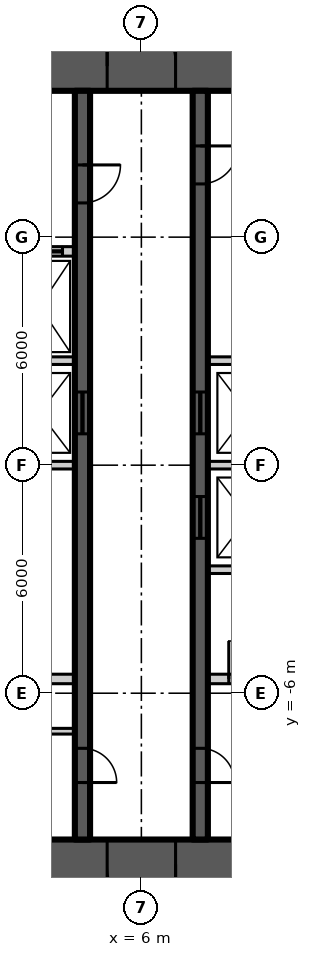
"""IFC4 building model, lengths in metres.
Left out: names, types, materials, properties, quantities, classifications, styles, units other than length and angle.
Written with IfcOpenShell. Run it as: python <this file> out.ifc"""

import sys

from ifc_helpers import new_model, si_unit, direction, frame, frame_2d, origin, place, context, subcontext, project, spatial, rectangle, extrude, element, fill, save


model = new_model("IFC4")
c1 = context("Model", 3, precision=1e-05, world=origin(), true_north=direction((0.0, 1.0)))
c2 = subcontext(c1, "Body", "Model", "MODEL_VIEW")
j1 = project(units=[si_unit("LENGTHUNIT", "METRE"), si_unit("PLANEANGLEUNIT", "RADIAN")], contexts=[c1])
p1 = place(None, origin())
s1 = spatial("IfcSite", under=j1, at=p1, CompositionType="ELEMENT")
p2 = place(p1, origin())
s2 = spatial("IfcBuilding", under=s1, at=p2, CompositionType="ELEMENT")
p3 = place(p2, frame((0.0, 0.0, 298.5)))
s3 = spatial("IfcBuildingStorey", under=s2, at=p3, CompositionType="ELEMENT", Elevation=298.5)
p4 = place(p3, frame((-11.15, 10.5, 0.0), z_axis=(0.0, 0.0, 1.0), x_axis=(1.0, 0.0, 0.0)))
e1 = element("IfcWall", 1, at=p4, inside=s3, PredefinedType="SHEAR", context=c2, shape_type="SweptSolid", body=[
    extrude(rectangle(XDim=22.3, YDim=1.3, at=frame_2d((11.15, 0.0))), origin(), (0.0, 0.0, 1.0), 3.9),
])
p5 = place(p4, frame((4.25, 0.0, 0.0)))
e2 = element("IfcOpeningElement", 2, at=p5, cuts=e1, PredefinedType="OPENING", context=c2, shape_type="SweptSolid", body=[
    extrude(rectangle(XDim=1.8, YDim=2.2, at=frame_2d((0.9, 1.1))), frame((0.0, 0.66, 0.0), z_axis=(0.0, -1.0, 0.0), x_axis=(1.0, 0.0, 0.0)), (0.0, 0.0, 1.0), 1.32),
])
p6 = place(p4, frame((16.25, 0.0, 0.0)))
e3 = element("IfcOpeningElement", 3, at=p6, cuts=e1, PredefinedType="OPENING", context=c2, shape_type="SweptSolid", body=[
    extrude(rectangle(XDim=1.8, YDim=2.2, at=frame_2d((0.9, 1.1))), frame((0.0, 0.66, 0.0), z_axis=(0.0, -1.0, 0.0), x_axis=(1.0, 0.0, 0.0)), (0.0, 0.0, 1.0), 1.32),
])
p7 = place(p3, frame((11.15, -10.5, 0.0), z_axis=(0.0, 0.0, 1.0), x_axis=(-1.0, 0.0, 0.0)))
e4 = element("IfcWall", 4, at=p7, inside=s3, PredefinedType="SHEAR", context=c2, shape_type="SweptSolid", body=[
    extrude(rectangle(XDim=22.3, YDim=1.3, at=frame_2d((11.15, 0.0))), origin(), (0.0, 0.0, 1.0), 3.9),
])
p8 = place(p7, frame((16.25, 0.0, 0.0)))
e5 = element("IfcOpeningElement", 5, at=p8, cuts=e4, PredefinedType="OPENING", context=c2, shape_type="SweptSolid", body=[
    extrude(rectangle(XDim=1.8, YDim=2.2, at=frame_2d((0.9, 1.1))), frame((0.0, 0.66, 0.0), z_axis=(0.0, -1.0, 0.0), x_axis=(1.0, 0.0, 0.0)), (0.0, 0.0, 1.0), 1.32),
])
p9 = place(p7, frame((4.25, 0.0, 0.0)))
e6 = element("IfcOpeningElement", 6, at=p9, cuts=e4, PredefinedType="OPENING", context=c2, shape_type="SweptSolid", body=[
    extrude(rectangle(XDim=1.8, YDim=2.2, at=frame_2d((0.9, 1.1))), frame((0.0, 0.66, 0.0), z_axis=(0.0, -1.0, 0.0), x_axis=(1.0, 0.0, 0.0)), (0.0, 0.0, 1.0), 1.32),
])
p10 = place(p3, frame((7.55, 9.85, 0.0), z_axis=(0.0, 0.0, 1.0), x_axis=(0.0, -1.0, 0.0)))
e7 = element("IfcWall", 7, at=p10, inside=s3, PredefinedType="SHEAR", context=c2, shape_type="SweptSolid", body=[
    extrude(rectangle(XDim=19.7, YDim=0.4, at=frame_2d((9.85, 0.0))), origin(), (0.0, 0.0, 1.0), 3.9),
])
p11 = place(p10, frame((1.45, 0.0, 0.0)))
e8 = element("IfcOpeningElement", 8, at=p11, cuts=e7, PredefinedType="OPENING", context=c2, shape_type="SweptSolid", body=[
    extrude(rectangle(XDim=1.0, YDim=2.2, at=frame_2d((0.5, 1.1))), frame((0.0, 0.21, 0.0), z_axis=(0.0, -1.0, 0.0), x_axis=(1.0, 0.0, 0.0)), (0.0, 0.0, 1.0), 0.42),
])
p12 = place(p10, frame((17.3, 0.0, 0.0)))
e9 = element("IfcOpeningElement", 9, at=p12, cuts=e7, PredefinedType="OPENING", context=c2, shape_type="SweptSolid", body=[
    extrude(rectangle(XDim=0.9, YDim=2.1, at=frame_2d((0.45, 1.05))), frame((0.0, 0.21, 0.0), z_axis=(0.0, -1.0, 0.0), x_axis=(1.0, 0.0, 0.0)), (0.0, 0.0, 1.0), 0.42),
])
p13 = place(p10, frame((7.925, 0.0, 0.0)))
e10 = element("IfcOpeningElement", 10, at=p13, cuts=e7, PredefinedType="OPENING", context=c2, shape_type="SweptSolid", body=[
    extrude(rectangle(XDim=1.1, YDim=2.2, at=frame_2d((0.55, 1.1))), frame((0.0, 0.21, 0.0), z_axis=(0.0, -1.0, 0.0), x_axis=(1.0, 0.0, 0.0)), (0.0, 0.0, 1.0), 0.42),
])
p14 = place(p10, frame((10.675, 0.0, 0.0)))
e11 = element("IfcOpeningElement", 11, at=p14, cuts=e7, PredefinedType="OPENING", context=c2, shape_type="SweptSolid", body=[
    extrude(rectangle(XDim=1.1, YDim=2.2, at=frame_2d((0.55, 1.1))), frame((0.0, 0.21, 0.0), z_axis=(0.0, -1.0, 0.0), x_axis=(1.0, 0.0, 0.0)), (0.0, 0.0, 1.0), 0.42),
])
p15 = place(p3, frame((4.45, 9.85, 0.0), z_axis=(0.0, 0.0, 1.0), x_axis=(0.0, -1.0, 0.0)))
e12 = element("IfcWall", 12, at=p15, inside=s3, PredefinedType="SHEAR", context=c2, shape_type="SweptSolid", body=[
    extrude(rectangle(XDim=19.7, YDim=0.4, at=frame_2d((9.85, 0.0))), origin(), (0.0, 0.0, 1.0), 3.9),
])
p16 = place(p15, frame((1.95, 0.0, 0.0)))
e13 = element("IfcOpeningElement", 13, at=p16, cuts=e12, PredefinedType="OPENING", context=c2, shape_type="SweptSolid", body=[
    extrude(rectangle(XDim=1.0, YDim=2.2, at=frame_2d((0.5, 1.1))), frame((0.0, 0.21, 0.0), z_axis=(0.0, -1.0, 0.0), x_axis=(1.0, 0.0, 0.0)), (0.0, 0.0, 1.0), 0.42),
])
p17 = place(p15, frame((17.3, 0.0, 0.0)))
e14 = element("IfcOpeningElement", 14, at=p17, cuts=e12, PredefinedType="OPENING", context=c2, shape_type="SweptSolid", body=[
    extrude(rectangle(XDim=0.9, YDim=2.1, at=frame_2d((0.45, 1.05))), frame((0.0, 0.21, 0.0), z_axis=(0.0, -1.0, 0.0), x_axis=(1.0, 0.0, 0.0)), (0.0, 0.0, 1.0), 0.42),
])
p18 = place(p15, frame((7.925, 0.0, 0.0)))
e15 = element("IfcOpeningElement", 15, at=p18, cuts=e12, PredefinedType="OPENING", context=c2, shape_type="SweptSolid", body=[
    extrude(rectangle(XDim=1.1, YDim=2.2, at=frame_2d((0.55, 1.1))), frame((0.0, 0.21, 0.0), z_axis=(0.0, -1.0, 0.0), x_axis=(1.0, 0.0, 0.0)), (0.0, 0.0, 1.0), 0.42),
])
p19 = place(p3, frame((2.4, 5.625, 0.0), z_axis=(0.0, 0.0, 1.0), x_axis=(1.0, 0.0, 0.0)))
e16 = element("IfcWall", 16, at=p19, inside=s3, PredefinedType="SOLIDWALL", context=c2, shape_type="SweptSolid", body=[
    extrude(rectangle(XDim=1.85, YDim=0.25, at=frame_2d((0.925, 0.0))), origin(), (0.0, 0.0, 1.0), 3.7),
])
p20 = place(p19, frame((0.325, 0.0, 0.0)))
e17 = element("IfcOpeningElement", 17, at=p20, cuts=e16, PredefinedType="OPENING", context=c2, shape_type="SweptSolid", body=[
    extrude(rectangle(XDim=1.2, YDim=2.2, at=frame_2d((0.6, 1.1))), frame((0.0, 0.135, 0.0), z_axis=(0.0, -1.0, 0.0), x_axis=(1.0, 0.0, 0.0)), (0.0, 0.0, 1.0), 0.27),
])
p21 = place(p3, frame((2.4, -5.625, 0.0), z_axis=(0.0, 0.0, 1.0), x_axis=(1.0, 0.0, 0.0)))
e18 = element("IfcWall", 18, at=p21, inside=s3, PredefinedType="SOLIDWALL", context=c2, shape_type="SweptSolid", body=[
    extrude(rectangle(XDim=1.85, YDim=0.25, at=frame_2d((0.925, 0.0))), origin(), (0.0, 0.0, 1.0), 3.7),
])
p22 = place(p3, frame((7.75, -5.625, 0.0), z_axis=(0.0, 0.0, 1.0), x_axis=(1.0, 0.0, 0.0)))
e19 = element("IfcWall", 19, at=p22, inside=s3, PredefinedType="SOLIDWALL", context=c2, shape_type="SweptSolid", body=[
    extrude(rectangle(XDim=2.1, YDim=0.25, at=frame_2d((1.05, 0.0))), origin(), (0.0, 0.0, 1.0), 3.7),
])
p23 = place(p22, frame((0.55, 0.0, 0.0)))
e20 = element("IfcOpeningElement", 20, at=p23, cuts=e19, PredefinedType="OPENING", context=c2, shape_type="SweptSolid", body=[
    extrude(rectangle(XDim=1.0, YDim=2.2, at=frame_2d((0.5, 1.1))), frame((0.0, 0.135, 0.0), z_axis=(0.0, -1.0, 0.0), x_axis=(1.0, 0.0, 0.0)), (0.0, 0.0, 1.0), 0.27),
])
p24 = place(p3, frame((7.75, -2.75, 0.0), z_axis=(0.0, 0.0, 1.0), x_axis=(1.0, 0.0, 0.0)))
e21 = element("IfcWall", 21, at=p24, inside=s3, PredefinedType="SOLIDWALL", context=c2, shape_type="SweptSolid", body=[
    extrude(rectangle(XDim=2.1, YDim=0.2, at=frame_2d((1.05, 0.0))), origin(), (0.0, 0.0, 1.0), 3.7),
])
p25 = place(p3, frame((2.4, 0.0, 0.0), z_axis=(0.0, 0.0, 1.0), x_axis=(1.0, 0.0, 0.0)))
e22 = element("IfcWall", 22, at=p25, inside=s3, PredefinedType="SOLIDWALL", context=c2, shape_type="SweptSolid", body=[
    extrude(rectangle(XDim=1.85, YDim=0.2, at=frame_2d((0.925, 0.0))), origin(), (0.0, 0.0, 1.0), 3.7),
])
p26 = place(p3, frame((7.75, 0.0, 0.0), z_axis=(0.0, 0.0, 1.0), x_axis=(1.0, 0.0, 0.0)))
e23 = element("IfcWall", 23, at=p26, inside=s3, PredefinedType="SOLIDWALL", context=c2, shape_type="SweptSolid", body=[
    extrude(rectangle(XDim=2.1, YDim=0.2, at=frame_2d((1.05, 0.0))), origin(), (0.0, 0.0, 1.0), 3.7),
])
p27 = place(p3, frame((2.4, 2.75, 0.0), z_axis=(0.0, 0.0, 1.0), x_axis=(1.0, 0.0, 0.0)))
e24 = element("IfcWall", 24, at=p27, inside=s3, PredefinedType="SOLIDWALL", context=c2, shape_type="SweptSolid", body=[
    extrude(rectangle(XDim=1.85, YDim=0.2, at=frame_2d((0.925, 0.0))), origin(), (0.0, 0.0, 1.0), 3.7),
])
p28 = place(p3, frame((7.75, 2.75, 0.0), z_axis=(0.0, 0.0, 1.0), x_axis=(1.0, 0.0, 0.0)))
e25 = element("IfcWall", 25, at=p28, inside=s3, PredefinedType="SOLIDWALL", context=c2, shape_type="SweptSolid", body=[
    extrude(rectangle(XDim=2.1, YDim=0.2, at=frame_2d((1.05, 0.0))), origin(), (0.0, 0.0, 1.0), 3.7),
])
p29 = place(p3, frame((2.4, -7.0, 0.0), z_axis=(0.0, 0.0, 1.0), x_axis=(1.0, 0.0, 0.0)))
e26 = element("IfcWall", 26, at=p29, inside=s3, PredefinedType="SOLIDWALL", context=c2, shape_type="SweptSolid", body=[
    extrude(rectangle(XDim=1.85, YDim=0.15, at=frame_2d((0.925, 0.0))), origin(), (0.0, 0.0, 1.0), 3.77),
])
p30 = place(p29, frame((0.1, 0.0, 0.0)))
e27 = element("IfcOpeningElement", 27, at=p30, cuts=e26, PredefinedType="OPENING", context=c2, shape_type="SweptSolid", body=[
    extrude(rectangle(XDim=0.9, YDim=2.1, at=frame_2d((0.45, 1.05))), frame((0.0, 0.085, 0.0), z_axis=(0.0, -1.0, 0.0), x_axis=(1.0, 0.0, 0.0)), (0.0, 0.0, 1.0), 0.17),
])
p31 = place(p6, origin())
e28 = element("IfcDoor", 28, at=p31, inside=s3, OperationType="DOUBLE_DOOR_DOUBLE_SWING", PredefinedType="DOOR", context=c2, shape_type="SweptSolid", body=[
    extrude(rectangle(XDim=1.8, YDim=2.2, at=frame_2d((0.9, 1.1))), frame((0.0, 0.025, 0.0), z_axis=(0.0, -1.0, 0.0), x_axis=(1.0, 0.0, 0.0)), (0.0, 0.0, 1.0), 0.05),
])
fill(e3, e28)
p32 = place(p9, origin())
e29 = element("IfcDoor", 29, at=p32, inside=s3, OperationType="DOUBLE_DOOR_DOUBLE_SWING", PredefinedType="DOOR", context=c2, shape_type="SweptSolid", body=[
    extrude(rectangle(XDim=1.8, YDim=2.2, at=frame_2d((0.9, 1.1))), frame((0.0, 0.025, 0.0), z_axis=(0.0, -1.0, 0.0), x_axis=(1.0, 0.0, 0.0)), (0.0, 0.0, 1.0), 0.05),
])
fill(e6, e29)
p33 = place(p11, origin())
e30 = element("IfcDoor", 30, at=p33, inside=s3, OperationType="SINGLE_SWING_LEFT", PredefinedType="DOOR", context=c2, shape_type="SweptSolid", body=[
    extrude(rectangle(XDim=1.0, YDim=2.2, at=frame_2d((0.5, 1.1))), frame((0.0, 0.025, 0.0), z_axis=(0.0, -1.0, 0.0), x_axis=(1.0, 0.0, 0.0)), (0.0, 0.0, 1.0), 0.05),
])
fill(e8, e30)
p34 = place(p16, origin())
e31 = element("IfcDoor", 31, at=p34, inside=s3, OperationType="SINGLE_SWING_LEFT", PredefinedType="DOOR", context=c2, shape_type="SweptSolid", body=[
    extrude(rectangle(XDim=1.0, YDim=2.2, at=frame_2d((0.5, 1.1))), frame((0.0, 0.025, 0.0), z_axis=(0.0, -1.0, 0.0), x_axis=(1.0, 0.0, 0.0)), (0.0, 0.0, 1.0), 0.05),
])
fill(e13, e31)
p35 = place(p12, origin())
e32 = element("IfcDoor", 32, at=p35, inside=s3, OperationType="SINGLE_SWING_RIGHT", PredefinedType="DOOR", context=c2, shape_type="SweptSolid", body=[
    extrude(rectangle(XDim=0.9, YDim=2.1, at=frame_2d((0.45, 1.05))), frame((0.0, 0.025, 0.0), z_axis=(0.0, -1.0, 0.0), x_axis=(1.0, 0.0, 0.0)), (0.0, 0.0, 1.0), 0.05),
])
fill(e9, e32)
p36 = place(p17, origin())
e33 = element("IfcDoor", 33, at=p36, inside=s3, OperationType="SINGLE_SWING_RIGHT", PredefinedType="DOOR", context=c2, shape_type="SweptSolid", body=[
    extrude(rectangle(XDim=0.9, YDim=2.1, at=frame_2d((0.45, 1.05))), frame((0.0, 0.025, 0.0), z_axis=(0.0, -1.0, 0.0), x_axis=(1.0, 0.0, 0.0)), (0.0, 0.0, 1.0), 0.05),
])
fill(e14, e33)
p37 = place(p13, origin())
e34 = element("IfcDoor", 34, at=p37, inside=s3, OperationType="SLIDING_TO_LEFT", PredefinedType="DOOR", context=c2, shape_type="SweptSolid", body=[
    extrude(rectangle(XDim=1.1, YDim=2.2, at=frame_2d((0.55, 1.1))), frame((0.0, 0.025, 0.0), z_axis=(0.0, -1.0, 0.0), x_axis=(1.0, 0.0, 0.0)), (0.0, 0.0, 1.0), 0.05),
])
fill(e10, e34)
p38 = place(p14, origin())
e35 = element("IfcDoor", 35, at=p38, inside=s3, OperationType="SLIDING_TO_LEFT", PredefinedType="DOOR", context=c2, shape_type="SweptSolid", body=[
    extrude(rectangle(XDim=1.1, YDim=2.2, at=frame_2d((0.55, 1.1))), frame((0.0, 0.025, 0.0), z_axis=(0.0, -1.0, 0.0), x_axis=(1.0, 0.0, 0.0)), (0.0, 0.0, 1.0), 0.05),
])
fill(e11, e35)
p39 = place(p18, origin())
e36 = element("IfcDoor", 36, at=p39, inside=s3, OperationType="SLIDING_TO_LEFT", PredefinedType="DOOR", context=c2, shape_type="SweptSolid", body=[
    extrude(rectangle(XDim=1.1, YDim=2.2, at=frame_2d((0.55, 1.1))), frame((0.0, 0.025, 0.0), z_axis=(0.0, -1.0, 0.0), x_axis=(1.0, 0.0, 0.0)), (0.0, 0.0, 1.0), 0.05),
])
fill(e15, e36)
p40 = place(p20, origin())
e37 = element("IfcDoor", 37, at=p40, inside=s3, OperationType="SLIDING_TO_LEFT", PredefinedType="DOOR", context=c2, shape_type="SweptSolid", body=[
    extrude(rectangle(XDim=1.2, YDim=2.2, at=frame_2d((0.6, 1.1))), frame((0.0, 0.025, 0.0), z_axis=(0.0, -1.0, 0.0), x_axis=(1.0, 0.0, 0.0)), (0.0, 0.0, 1.0), 0.05),
])
fill(e17, e37)
p41 = place(p23, origin())
e38 = element("IfcDoor", 38, at=p41, inside=s3, OperationType="SINGLE_SWING_LEFT", PredefinedType="DOOR", context=c2, shape_type="SweptSolid", body=[
    extrude(rectangle(XDim=1.0, YDim=2.2, at=frame_2d((0.5, 1.1))), frame((0.0, 0.025, 0.0), z_axis=(0.0, -1.0, 0.0), x_axis=(1.0, 0.0, 0.0)), (0.0, 0.0, 1.0), 0.05),
])
fill(e20, e38)
save(model, sys.argv[1])
